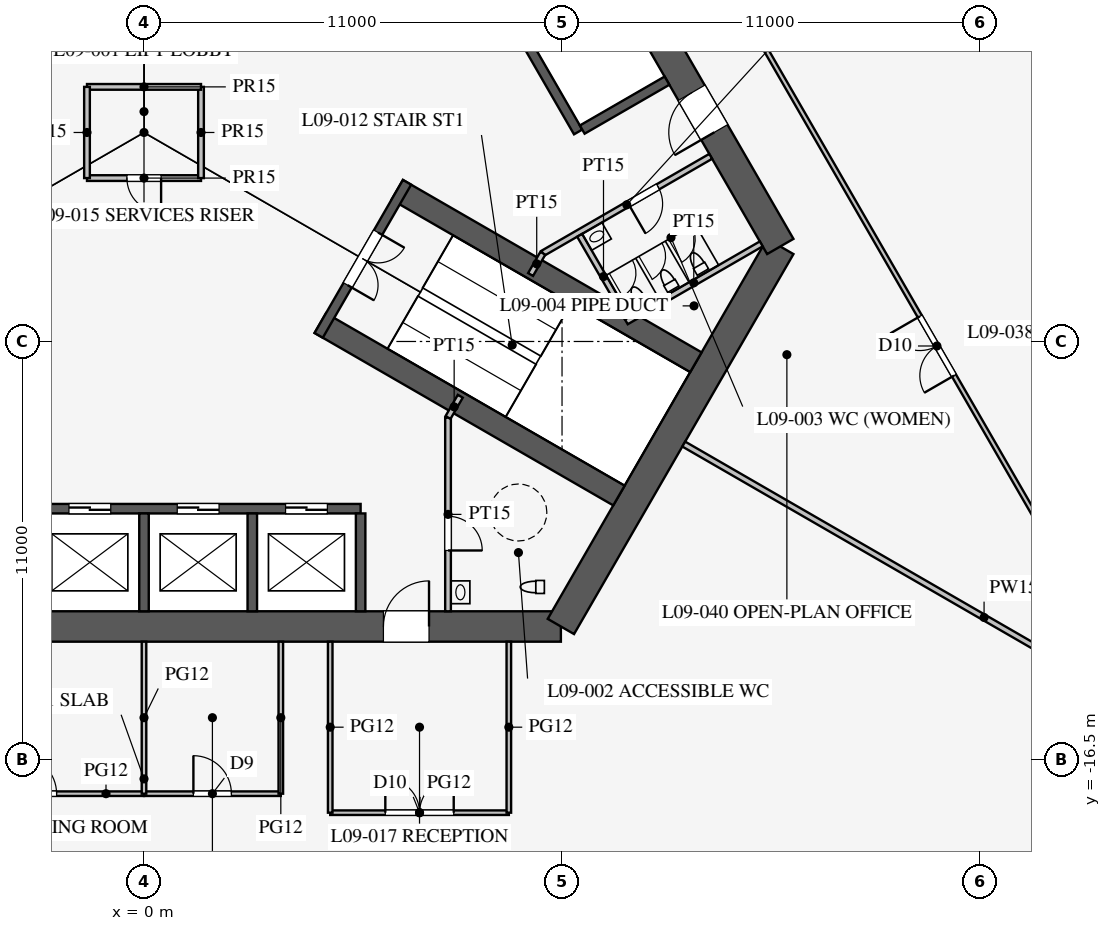
"""IFC4 building model, lengths in metres.
Left out: names, types, materials, properties, quantities, classifications, styles, units other than length and angle.
Written with IfcOpenShell. Run it as: python <this file> out.ifc"""

import sys

from ifc_helpers import new_model, si_unit, direction, frame, frame_2d, origin, place, context, subcontext, project, spatial, rectangle, extrude, element, fill, save


model = new_model("IFC4")
c1 = context("Model", 3, precision=1e-05, world=origin(), true_north=direction((0.0, 1.0)))
c2 = subcontext(c1, "Body", "Model", "MODEL_VIEW")
j1 = project(units=[si_unit("LENGTHUNIT", "METRE"), si_unit("PLANEANGLEUNIT", "RADIAN")], contexts=[c1])
p1 = place(None, origin())
s1 = spatial("IfcSite", under=j1, at=p1, CompositionType="ELEMENT")
p2 = place(p1, origin())
s2 = spatial("IfcBuilding", under=s1, at=p2, CompositionType="ELEMENT")
p3 = place(p2, frame((0.0, 0.0, 41.7)))
s3 = spatial("IfcBuildingStorey", under=s2, at=p3, CompositionType="ELEMENT", Elevation=41.7)
p4 = place(p3, frame((-10.97, -13.0, 0.0), z_axis=(0.0, 0.0, 1.0), x_axis=(1.0, 0.0, 0.0)))
e1 = element("IfcWall", 1, at=p4, inside=s3, PredefinedType="SHEAR", context=c2, shape_type="SweptSolid", body=[
    extrude(rectangle(XDim=21.939, YDim=0.8, at=frame_2d((10.97, 0.0))), origin(), (0.0, 0.0, 1.0), 4.2),
])
p5 = place(p4, frame((17.27, 0.0, 0.0)))
e2 = element("IfcOpeningElement", 2, at=p5, cuts=e1, PredefinedType="OPENING", context=c2, shape_type="SweptSolid", body=[
    extrude(rectangle(XDim=1.2, YDim=2.1, at=frame_2d((0.6, 1.05))), frame((0.0, 0.41, 0.0), z_axis=(0.0, -1.0, 0.0), x_axis=(1.0, 0.0, 0.0)), (0.0, 0.0, 1.0), 0.82),
])
p6 = place(p4, frame((3.47, 0.0, 0.0)))
e3 = element("IfcOpeningElement", 3, at=p6, cuts=e1, PredefinedType="OPENING", context=c2, shape_type="SweptSolid", body=[
    extrude(rectangle(XDim=1.2, YDim=2.1, at=frame_2d((0.6, 1.05))), frame((0.0, 0.41, 0.0), z_axis=(0.0, -1.0, 0.0), x_axis=(1.0, 0.0, 0.0)), (0.0, 0.0, 1.0), 0.82),
])
p7 = place(p3, frame((10.97, -13.0, 0.0), z_axis=(0.0, 0.0, 1.0), x_axis=(0.499995765644, 0.866027848477, 0.0)))
e4 = element("IfcWall", 4, at=p7, inside=s3, PredefinedType="SHEAR", context=c2, shape_type="SweptSolid", body=[
    extrude(rectangle(XDim=11.547, YDim=0.8, at=frame_2d((5.773, 0.0))), origin(), (0.0, 0.0, 1.0), 4.2),
])
p8 = place(p3, frame((16.743, -3.0, 0.0), z_axis=(0.0, 0.0, 1.0), x_axis=(-0.500002442456, 0.866023993627, 0.0)))
e5 = element("IfcWall", 5, at=p8, inside=s3, PredefinedType="SHEAR", context=c2, shape_type="SweptSolid", body=[
    extrude(rectangle(XDim=21.939, YDim=0.8, at=frame_2d((10.97, 0.0))), origin(), (0.0, 0.0, 1.0), 4.2),
])
p9 = place(p8, frame((17.27, 0.0, 0.0)))
e6 = element("IfcOpeningElement", 6, at=p9, cuts=e5, PredefinedType="OPENING", context=c2, shape_type="SweptSolid", body=[
    extrude(rectangle(XDim=1.2, YDim=2.1, at=frame_2d((0.6, 1.05))), frame((0.0, 0.41, 0.0), z_axis=(0.0, -1.0, 0.0), x_axis=(1.0, 0.0, 0.0)), (0.0, 0.0, 1.0), 0.82),
])
p10 = place(p8, frame((3.47, 0.0, 0.0)))
e7 = element("IfcOpeningElement", 7, at=p10, cuts=e5, PredefinedType="OPENING", context=c2, shape_type="SweptSolid", body=[
    extrude(rectangle(XDim=1.2, YDim=2.1, at=frame_2d((0.6, 1.05))), frame((0.0, 0.41, 0.0), z_axis=(0.0, -1.0, 0.0), x_axis=(1.0, 0.0, 0.0)), (0.0, 0.0, 1.0), 0.82),
])
p11 = place(p3, frame((-5.7, -9.9, 0.0), z_axis=(0.0, 0.0, 1.0), x_axis=(1.0, 0.0, 0.0)))
e8 = element("IfcWall", 8, at=p11, inside=s3, PredefinedType="SHEAR", context=c2, shape_type="SweptSolid", body=[
    extrude(rectangle(XDim=11.4, YDim=0.25, at=frame_2d((5.7, 0.0))), origin(), (0.0, 0.0, 1.0), 4.2),
])
p12 = place(p11, frame((0.875, 0.0, 0.0)))
e9 = element("IfcOpeningElement", 9, at=p12, cuts=e8, PredefinedType="OPENING", context=c2, shape_type="SweptSolid", body=[
    extrude(rectangle(XDim=1.1, YDim=2.2, at=frame_2d((0.55, 1.1))), frame((0.0, 0.135, 0.0), z_axis=(0.0, -1.0, 0.0), x_axis=(1.0, 0.0, 0.0)), (0.0, 0.0, 1.0), 0.27),
])
p13 = place(p11, frame((3.725, 0.0, 0.0)))
e10 = element("IfcOpeningElement", 10, at=p13, cuts=e8, PredefinedType="OPENING", context=c2, shape_type="SweptSolid", body=[
    extrude(rectangle(XDim=1.1, YDim=2.2, at=frame_2d((0.55, 1.1))), frame((0.0, 0.135, 0.0), z_axis=(0.0, -1.0, 0.0), x_axis=(1.0, 0.0, 0.0)), (0.0, 0.0, 1.0), 0.27),
])
p14 = place(p11, frame((6.575, 0.0, 0.0)))
e11 = element("IfcOpeningElement", 11, at=p14, cuts=e8, PredefinedType="OPENING", context=c2, shape_type="SweptSolid", body=[
    extrude(rectangle(XDim=1.1, YDim=2.2, at=frame_2d((0.55, 1.1))), frame((0.0, 0.135, 0.0), z_axis=(0.0, -1.0, 0.0), x_axis=(1.0, 0.0, 0.0)), (0.0, 0.0, 1.0), 0.27),
])
p15 = place(p11, frame((9.425, 0.0, 0.0)))
e12 = element("IfcOpeningElement", 12, at=p15, cuts=e8, PredefinedType="OPENING", context=c2, shape_type="SweptSolid", body=[
    extrude(rectangle(XDim=1.1, YDim=2.2, at=frame_2d((0.55, 1.1))), frame((0.0, 0.135, 0.0), z_axis=(0.0, -1.0, 0.0), x_axis=(1.0, 0.0, 0.0)), (0.0, 0.0, 1.0), 0.27),
])
for number, where, z_axis, x_axis in (
    (13, (0.0, -10.025, 0.0), (0.0, 0.0, 1.0), (0.0, -1.0, 0.0)),
    (14, (2.85, -10.025, 0.0), (0.0, 0.0, 1.0), (0.0, -1.0, 0.0)),
    (15, (5.7, -10.025, 0.0), (0.0, 0.0, 1.0), (0.0, -1.0, 0.0)),
):
    element("IfcWall", number, at=place(p3, frame(where, z_axis=z_axis, x_axis=x_axis)), inside=s3, PredefinedType="SHEAR", context=c2, shape_type="SweptSolid", body=[
        extrude(rectangle(XDim=2.575, YDim=0.25, at=frame_2d((1.288, 0.0))), origin(), (0.0, 0.0, 1.0), 4.2),
    ])
p16 = place(p3, frame((11.424, 0.014, 0.0), z_axis=(0.0, 0.0, 1.0), x_axis=(-0.500001763848, 0.866024385424, 0.0)))
e16 = element("IfcWall", 16, at=p16, inside=s3, PredefinedType="SHEAR", context=c2, shape_type="SweptSolid", body=[
    extrude(rectangle(XDim=11.4, YDim=0.25, at=frame_2d((5.7, 0.0))), origin(), (0.0, 0.0, 1.0), 4.2),
])
p17 = place(p3, frame((11.532, 0.076, 0.0), z_axis=(0.0, 0.0, 1.0), x_axis=(0.866005588531, 0.500034319456, 0.0)))
e17 = element("IfcWall", 17, at=p17, inside=s3, PredefinedType="SHEAR", context=c2, shape_type="SweptSolid", body=[
    extrude(rectangle(XDim=2.575, YDim=0.25, at=frame_2d((1.288, 0.0))), origin(), (0.0, 0.0, 1.0), 4.2),
])
for number, where, z_axis, x_axis in (
    (18, (4.638, -5.016, 0.0), (0.0, 0.0, 1.0), (0.866, -0.5, 0.0)),
    (19, (6.663, -1.509, 0.0), (0.0, 0.0, 1.0), (0.866, -0.5, 0.0)),
):
    element("IfcWall", number, at=place(p3, frame(where, z_axis=z_axis, x_axis=x_axis)), inside=s3, PredefinedType="SHEAR", context=c2, shape_type="SweptSolid", body=[
        extrude(rectangle(XDim=9.075, YDim=0.6, at=frame_2d((4.538, 0.0))), origin(), (0.0, 0.0, 1.0), 4.2),
    ])
p18 = place(p3, frame((4.597, -5.339, 0.0), z_axis=(0.0, 0.0, 1.0), x_axis=(0.499984536904, 0.866034331223, 0.0)))
e20 = element("IfcWall", 20, at=p18, inside=s3, PredefinedType="SHEAR", context=c2, shape_type="SweptSolid", body=[
    extrude(rectangle(XDim=4.65, YDim=0.25, at=frame_2d((2.325, 0.0))), origin(), (0.0, 0.0, 1.0), 4.2),
])
p19 = place(p18, frame((1.525, 0.0, 0.0)))
e21 = element("IfcOpeningElement", 21, at=p19, cuts=e20, PredefinedType="OPENING", context=c2, shape_type="SweptSolid", body=[
    extrude(rectangle(XDim=1.6, YDim=2.1, at=frame_2d((0.8, 1.05))), frame((0.0, 0.135, 0.0), z_axis=(0.0, -1.0, 0.0), x_axis=(1.0, 0.0, 0.0)), (0.0, 0.0, 1.0), 0.27),
])
p20 = place(p3, frame((8.0, -7.5, 0.0), z_axis=(0.0, 0.0, 1.0), x_axis=(0.0, -1.0, 0.0)))
e22 = element("IfcWall", 22, at=p20, inside=s3, PredefinedType="PARTITIONING", context=c2, shape_type="SweptSolid", body=[
    extrude(rectangle(XDim=5.1, YDim=0.15, at=frame_2d((2.55, 0.0))), origin(), (0.0, 0.0, 1.0), 4.0),
])
p21 = place(p20, frame((2.6, 0.0, 0.0)))
e23 = element("IfcOpeningElement", 23, at=p21, cuts=e22, PredefinedType="OPENING", context=c2, shape_type="SweptSolid", body=[
    extrude(rectangle(XDim=0.9, YDim=2.1, at=frame_2d((0.45, 1.05))), frame((0.0, 0.085, 0.0), z_axis=(0.0, -1.0, 0.0), x_axis=(1.0, 0.0, 0.0)), (0.0, 0.0, 1.0), 0.17),
])
p22 = place(p3, frame((10.495, -3.178, 0.0), z_axis=(0.0, 0.0, 1.0), x_axis=(0.86602216432, 0.500005610874, 0.0)))
e24 = element("IfcWall", 24, at=p22, inside=s3, PredefinedType="PARTITIONING", context=c2, shape_type="SweptSolid", body=[
    extrude(rectangle(XDim=5.1, YDim=0.15, at=frame_2d((2.55, 0.0))), origin(), (0.0, 0.0, 1.0), 4.0),
])
p23 = place(p22, frame((2.6, 0.0, 0.0)))
e25 = element("IfcOpeningElement", 25, at=p23, cuts=e24, PredefinedType="OPENING", context=c2, shape_type="SweptSolid", body=[
    extrude(rectangle(XDim=0.9, YDim=2.1, at=frame_2d((0.45, 1.05))), frame((0.0, 0.085, 0.0), z_axis=(0.0, -1.0, 0.0), x_axis=(1.0, 0.0, 0.0)), (0.0, 0.0, 1.0), 0.17),
])
for number, where, z_axis, x_axis in (
    (26, (8.0, -7.5, 0.0), (0.0, 0.0, 1.0), (0.5, 0.866, 0.0)),
    (27, (10.495, -3.178, 0.0), (0.0, 0.0, 1.0), (-0.5, -0.866, 0.0)),
):
    element("IfcWall", number, at=place(p3, frame(where, z_axis=z_axis, x_axis=x_axis)), inside=s3, PredefinedType="PARTITIONING", context=c2, shape_type="SweptSolid", body=[
        extrude(rectangle(XDim=0.645, YDim=0.15, at=frame_2d((0.323, 0.0))), origin(), (0.0, 0.0, 1.0), 4.0),
    ])
p24 = place(p3, frame((12.691, -4.982, 0.0), z_axis=(0.0, 0.0, 1.0), x_axis=(0.8660249478, 0.500000789788, 0.0)))
e28 = element("IfcWall", 28, at=p24, inside=s3, PredefinedType="PARTITIONING", context=c2, shape_type="SweptSolid", body=[
    extrude(rectangle(XDim=4.1, YDim=0.15, at=frame_2d((2.05, 0.0))), origin(), (0.0, 0.0, 1.0), 4.0),
])
p25 = place(p3, frame((11.464, -2.706, 0.0), z_axis=(0.0, 0.0, 1.0), x_axis=(0.50001992892, -0.866013897511, 0.0)))
e29 = element("IfcWall", 29, at=p25, inside=s3, PredefinedType="PARTITIONING", context=c2, shape_type="SweptSolid", body=[
    extrude(rectangle(XDim=2.51, YDim=0.15, at=frame_2d((1.255, 0.0))), origin(), (0.0, 0.0, 1.0), 4.0),
])
p26 = place(p3, frame((-1.5, -1.2, 0.0), z_axis=(0.0, 0.0, 1.0), x_axis=(1.0, 0.0, 0.0)))
e30 = element("IfcWall", 30, at=p26, inside=s3, PredefinedType="PARTITIONING", context=c2, shape_type="SweptSolid", body=[
    extrude(rectangle(XDim=3.0, YDim=0.15, at=frame_2d((1.5, 0.0))), origin(), (0.0, 0.0, 1.0), 4.0),
])
p27 = place(p26, frame((1.05, 0.0, 0.0)))
e31 = element("IfcOpeningElement", 31, at=p27, cuts=e30, PredefinedType="OPENING", context=c2, shape_type="SweptSolid", body=[
    extrude(rectangle(XDim=0.9, YDim=2.1, at=frame_2d((0.45, 1.05))), frame((0.0, 0.085, 0.0), z_axis=(0.0, -1.0, 0.0), x_axis=(1.0, 0.0, 0.0)), (0.0, 0.0, 1.0), 0.17),
])
p28 = place(p3, frame((1.5, -1.2, 0.0), z_axis=(0.0, 0.0, 1.0), x_axis=(0.0, 1.0, 0.0)))
e32 = element("IfcWall", 32, at=p28, inside=s3, PredefinedType="PARTITIONING", context=c2, shape_type="SweptSolid", body=[
    extrude(rectangle(XDim=2.4, YDim=0.15, at=frame_2d((1.2, 0.0))), origin(), (0.0, 0.0, 1.0), 4.0),
])
p29 = place(p3, frame((1.5, 1.2, 0.0), z_axis=(0.0, 0.0, 1.0), x_axis=(-1.0, 0.0, 0.0)))
e33 = element("IfcWall", 33, at=p29, inside=s3, PredefinedType="PARTITIONING", context=c2, shape_type="SweptSolid", body=[
    extrude(rectangle(XDim=3.0, YDim=0.15, at=frame_2d((1.5, 0.0))), origin(), (0.0, 0.0, 1.0), 4.0),
])
p30 = place(p3, frame((-1.5, 1.2, 0.0), z_axis=(0.0, 0.0, 1.0), x_axis=(0.0, -1.0, 0.0)))
e34 = element("IfcWall", 34, at=p30, inside=s3, PredefinedType="PARTITIONING", context=c2, shape_type="SweptSolid", body=[
    extrude(rectangle(XDim=2.4, YDim=0.15, at=frame_2d((1.2, 0.0))), origin(), (0.0, 0.0, 1.0), 4.0),
])
p31 = place(p3, frame((14.203, -8.2, 0.0), z_axis=(0.0, 0.0, 1.0), x_axis=(0.866024965723, -0.500000758745, 0.0)))
e35 = element("IfcWall", 35, at=p31, inside=s3, PredefinedType="PARTITIONING", context=c2, shape_type="SweptSolid", body=[
    extrude(rectangle(XDim=18.25, YDim=0.15, at=frame_2d((9.125, 0.0))), origin(), (0.0, 0.0, 1.0), 2.3),
])
p32 = place(p3, frame((4.9, -17.9, 0.0), z_axis=(0.0, 0.0, 1.0), x_axis=(1.0, 0.0, 0.0)))
e36 = element("IfcWall", 36, at=p32, inside=s3, PredefinedType="PARTITIONING", context=c2, shape_type="SweptSolid", body=[
    extrude(rectangle(XDim=4.7, YDim=0.12, at=frame_2d((2.35, 0.0))), origin(), (0.0, 0.0, 1.0), 2.9),
])
p33 = place(p32, frame((1.45, 0.0, 0.15)))
e37 = element("IfcOpeningElement", 37, at=p33, cuts=e36, PredefinedType="OPENING", context=c2, shape_type="SweptSolid", body=[
    extrude(rectangle(XDim=1.8, YDim=2.1, at=frame_2d((0.9, 1.05))), frame((0.0, 0.07, 0.0), z_axis=(0.0, -1.0, 0.0), x_axis=(1.0, 0.0, 0.0)), (0.0, 0.0, 1.0), 0.14),
])
p34 = place(p3, frame((0.0, -17.4, 0.0), z_axis=(0.0, 0.0, 1.0), x_axis=(1.0, 0.0, 0.0)))
e38 = element("IfcWall", 38, at=p34, inside=s3, PredefinedType="PARTITIONING", context=c2, shape_type="SweptSolid", body=[
    extrude(rectangle(XDim=3.6, YDim=0.12, at=frame_2d((1.8, 0.0))), origin(), (0.0, 0.0, 1.0), 2.9),
])
p35 = place(p34, frame((1.3, 0.0, 0.15)))
e39 = element("IfcOpeningElement", 39, at=p35, cuts=e38, PredefinedType="OPENING", context=c2, shape_type="SweptSolid", body=[
    extrude(rectangle(XDim=1.0, YDim=2.1, at=frame_2d((0.5, 1.05))), frame((0.0, 0.07, 0.0), z_axis=(0.0, -1.0, 0.0), x_axis=(1.0, 0.0, 0.0)), (0.0, 0.0, 1.0), 0.14),
])
p36 = place(p3, frame((-5.6, -17.4, 0.0), z_axis=(0.0, 0.0, 1.0), x_axis=(1.0, 0.0, 0.0)))
e40 = element("IfcWall", 40, at=p36, inside=s3, PredefinedType="PARTITIONING", context=c2, shape_type="SweptSolid", body=[
    extrude(rectangle(XDim=5.6, YDim=0.12, at=frame_2d((2.8, 0.0))), origin(), (0.0, 0.0, 1.0), 2.9),
])
p37 = place(p36, frame((2.3, 0.0, 0.15)))
e41 = element("IfcOpeningElement", 41, at=p37, cuts=e40, PredefinedType="OPENING", context=c2, shape_type="SweptSolid", body=[
    extrude(rectangle(XDim=1.0, YDim=2.1, at=frame_2d((0.5, 1.05))), frame((0.0, 0.07, 0.0), z_axis=(0.0, -1.0, 0.0), x_axis=(1.0, 0.0, 0.0)), (0.0, 0.0, 1.0), 0.14),
])
p38 = place(p3, frame((3.6, -13.4, 0.0), z_axis=(0.0, 0.0, 1.0), x_axis=(0.0, -1.0, 0.0)))
e42 = element("IfcWall", 42, at=p38, inside=s3, PredefinedType="PARTITIONING", context=c2, shape_type="SweptSolid", body=[
    extrude(rectangle(XDim=4.0, YDim=0.12, at=frame_2d((2.0, 0.0))), origin(), (0.0, 0.0, 1.0), 2.9),
])
for number, where, z_axis, x_axis in (
    (43, (4.9, -13.4, 0.0), (0.0, 0.0, 1.0), (0.0, -1.0, 0.0)),
    (44, (9.6, -13.4, 0.0), (0.0, 0.0, 1.0), (0.0, -1.0, 0.0)),
):
    element("IfcWall", number, at=place(p3, frame(where, z_axis=z_axis, x_axis=x_axis)), inside=s3, PredefinedType="PARTITIONING", context=c2, shape_type="SweptSolid", body=[
        extrude(rectangle(XDim=4.5, YDim=0.12, at=frame_2d((2.25, 0.0))), origin(), (0.0, 0.0, 1.0), 2.9),
    ])
p39 = place(p3, frame((0.0, -13.4, 0.0), z_axis=(0.0, 0.0, 1.0), x_axis=(0.0, -1.0, 0.0)))
e45 = element("IfcWall", 45, at=p39, inside=s3, PredefinedType="PARTITIONING", context=c2, shape_type="SweptSolid", body=[
    extrude(rectangle(XDim=4.0, YDim=0.12, at=frame_2d((2.0, 0.0))), origin(), (0.0, 0.0, 1.0), 2.9),
])
p40 = place(p3, frame((26.415, -15.231, 0.0), z_axis=(0.0, 0.0, 1.0), x_axis=(-0.50000091641, 0.866024874695, 0.0)))
e46 = element("IfcWall", 46, at=p40, inside=s3, PredefinedType="PARTITIONING", context=c2, shape_type="SweptSolid", body=[
    extrude(rectangle(XDim=52.796, YDim=0.12, at=frame_2d((26.398, 0.0))), origin(), (0.0, 0.0, 1.0), 2.9),
])
p41 = place(p40, frame((10.2, 0.0, 0.15)))
e47 = element("IfcOpeningElement", 47, at=p41, cuts=e46, PredefinedType="OPENING", context=c2, shape_type="SweptSolid", body=[
    extrude(rectangle(XDim=1.8, YDim=2.1, at=frame_2d((0.9, 1.05))), frame((0.0, 0.07, 0.0), z_axis=(0.0, -1.0, 0.0), x_axis=(1.0, 0.0, 0.0)), (0.0, 0.0, 1.0), 0.14),
])
p42 = place(p40, frame((40.8, 0.0, 0.15)))
e48 = element("IfcOpeningElement", 48, at=p42, cuts=e46, PredefinedType="OPENING", context=c2, shape_type="SweptSolid", body=[
    extrude(rectangle(XDim=1.8, YDim=2.1, at=frame_2d((0.9, 1.05))), frame((0.0, 0.07, 0.0), z_axis=(0.0, -1.0, 0.0), x_axis=(1.0, 0.0, 0.0)), (0.0, 0.0, 1.0), 0.14),
])
p43 = place(p21, origin())
e49 = element("IfcDoor", 49, at=p43, inside=s3, OperationType="SINGLE_SWING_RIGHT", PredefinedType="DOOR", context=c2, shape_type="SweptSolid", body=[
    extrude(rectangle(XDim=0.9, YDim=2.1, at=frame_2d((0.45, 1.05))), frame((0.0, 0.025, 0.0), z_axis=(0.0, -1.0, 0.0), x_axis=(1.0, 0.0, 0.0)), (0.0, 0.0, 1.0), 0.05),
])
fill(e23, e49)
p44 = place(p23, frame((0.9, 0.0, 0.0), z_axis=(0.0, 0.0, 1.0), x_axis=(-1.0, 0.0, 0.0)))
e50 = element("IfcDoor", 50, at=p44, inside=s3, OperationType="SINGLE_SWING_RIGHT", PredefinedType="DOOR", context=c2, shape_type="SweptSolid", body=[
    extrude(rectangle(XDim=0.9, YDim=2.1, at=frame_2d((0.45, 1.05))), frame((0.0, 0.025, 0.0), z_axis=(0.0, -1.0, 0.0), x_axis=(1.0, 0.0, 0.0)), (0.0, 0.0, 1.0), 0.05),
])
fill(e25, e50)
p45 = place(p27, frame((0.9, 0.0, 0.0), z_axis=(0.0, 0.0, 1.0), x_axis=(-1.0, 0.0, 0.0)))
e51 = element("IfcDoor", 51, at=p45, inside=s3, OperationType="SINGLE_SWING_LEFT", PredefinedType="DOOR", context=c2, shape_type="SweptSolid", body=[
    extrude(rectangle(XDim=0.9, YDim=2.1, at=frame_2d((0.45, 1.05))), frame((0.0, 0.025, 0.0), z_axis=(0.0, -1.0, 0.0), x_axis=(1.0, 0.0, 0.0)), (0.0, 0.0, 1.0), 0.05),
])
fill(e31, e51)
p46 = place(p19, frame((1.6, 0.0, 0.0), z_axis=(0.0, 0.0, 1.0), x_axis=(-1.0, 0.0, 0.0)))
e52 = element("IfcDoor", 52, at=p46, inside=s3, OperationType="DOUBLE_DOOR_SINGLE_SWING", PredefinedType="DOOR", context=c2, shape_type="SweptSolid", body=[
    extrude(rectangle(XDim=1.6, YDim=2.1, at=frame_2d((0.8, 1.05))), frame((0.0, 0.025, 0.0), z_axis=(0.0, -1.0, 0.0), x_axis=(1.0, 0.0, 0.0)), (0.0, 0.0, 1.0), 0.05),
])
fill(e21, e52)
p47 = place(p5, origin())
e53 = element("IfcDoor", 53, at=p47, inside=s3, OperationType="SINGLE_SWING_RIGHT", PredefinedType="DOOR", context=c2, shape_type="SweptSolid", body=[
    extrude(rectangle(XDim=1.2, YDim=2.1, at=frame_2d((0.6, 1.05))), frame((0.0, 0.025, 0.0), z_axis=(0.0, -1.0, 0.0), x_axis=(1.0, 0.0, 0.0)), (0.0, 0.0, 1.0), 0.05),
])
fill(e2, e53)
p48 = place(p10, origin())
e54 = element("IfcDoor", 54, at=p48, inside=s3, OperationType="SINGLE_SWING_LEFT", PredefinedType="DOOR", context=c2, shape_type="SweptSolid", body=[
    extrude(rectangle(XDim=1.2, YDim=2.1, at=frame_2d((0.6, 1.05))), frame((0.0, 0.025, 0.0), z_axis=(0.0, -1.0, 0.0), x_axis=(1.0, 0.0, 0.0)), (0.0, 0.0, 1.0), 0.05),
])
fill(e7, e54)
p49 = place(p33, origin())
e55 = element("IfcDoor", 55, at=p49, inside=s3, OperationType="DOUBLE_DOOR_SINGLE_SWING", PredefinedType="DOOR", context=c2, shape_type="SweptSolid", body=[
    extrude(rectangle(XDim=1.8, YDim=2.1, at=frame_2d((0.9, 1.05))), frame((0.0, 0.025, 0.0), z_axis=(0.0, -1.0, 0.0), x_axis=(1.0, 0.0, 0.0)), (0.0, 0.0, 1.0), 0.05),
])
fill(e37, e55)
p50 = place(p37, origin())
e56 = element("IfcDoor", 56, at=p50, inside=s3, OperationType="SINGLE_SWING_LEFT", PredefinedType="DOOR", context=c2, shape_type="SweptSolid", body=[
    extrude(rectangle(XDim=1.0, YDim=2.1, at=frame_2d((0.5, 1.05))), frame((0.0, 0.025, 0.0), z_axis=(0.0, -1.0, 0.0), x_axis=(1.0, 0.0, 0.0)), (0.0, 0.0, 1.0), 0.05),
])
fill(e41, e56)
p51 = place(p35, origin())
e57 = element("IfcDoor", 57, at=p51, inside=s3, OperationType="SINGLE_SWING_LEFT", PredefinedType="DOOR", context=c2, shape_type="SweptSolid", body=[
    extrude(rectangle(XDim=1.0, YDim=2.1, at=frame_2d((0.5, 1.05))), frame((0.0, 0.025, 0.0), z_axis=(0.0, -1.0, 0.0), x_axis=(1.0, 0.0, 0.0)), (0.0, 0.0, 1.0), 0.05),
])
fill(e39, e57)
p52 = place(p41, origin())
e58 = element("IfcDoor", 58, at=p52, inside=s3, OperationType="DOUBLE_DOOR_SINGLE_SWING", PredefinedType="DOOR", context=c2, shape_type="SweptSolid", body=[
    extrude(rectangle(XDim=1.8, YDim=2.1, at=frame_2d((0.9, 1.05))), frame((0.0, 0.025, 0.0), z_axis=(0.0, -1.0, 0.0), x_axis=(1.0, 0.0, 0.0)), (0.0, 0.0, 1.0), 0.05),
])
fill(e47, e58)
p53 = place(p13, origin())
e59 = element("IfcDoor", 59, at=p53, inside=s3, OperationType="DOUBLE_DOOR_SLIDING", PredefinedType="DOOR", context=c2, shape_type="SweptSolid", body=[
    extrude(rectangle(XDim=1.1, YDim=2.2, at=frame_2d((0.55, 1.1))), frame((0.0, 0.025, 0.0), z_axis=(0.0, -1.0, 0.0), x_axis=(1.0, 0.0, 0.0)), (0.0, 0.0, 1.0), 0.05),
])
fill(e10, e59)
p54 = place(p14, origin())
e60 = element("IfcDoor", 60, at=p54, inside=s3, OperationType="DOUBLE_DOOR_SLIDING", PredefinedType="DOOR", context=c2, shape_type="SweptSolid", body=[
    extrude(rectangle(XDim=1.1, YDim=2.2, at=frame_2d((0.55, 1.1))), frame((0.0, 0.025, 0.0), z_axis=(0.0, -1.0, 0.0), x_axis=(1.0, 0.0, 0.0)), (0.0, 0.0, 1.0), 0.05),
])
fill(e11, e60)
p55 = place(p15, origin())
e61 = element("IfcDoor", 61, at=p55, inside=s3, OperationType="DOUBLE_DOOR_SLIDING", PredefinedType="DOOR", context=c2, shape_type="SweptSolid", body=[
    extrude(rectangle(XDim=1.1, YDim=2.2, at=frame_2d((0.55, 1.1))), frame((0.0, 0.025, 0.0), z_axis=(0.0, -1.0, 0.0), x_axis=(1.0, 0.0, 0.0)), (0.0, 0.0, 1.0), 0.05),
])
fill(e12, e61)
save(model, sys.argv[1])
